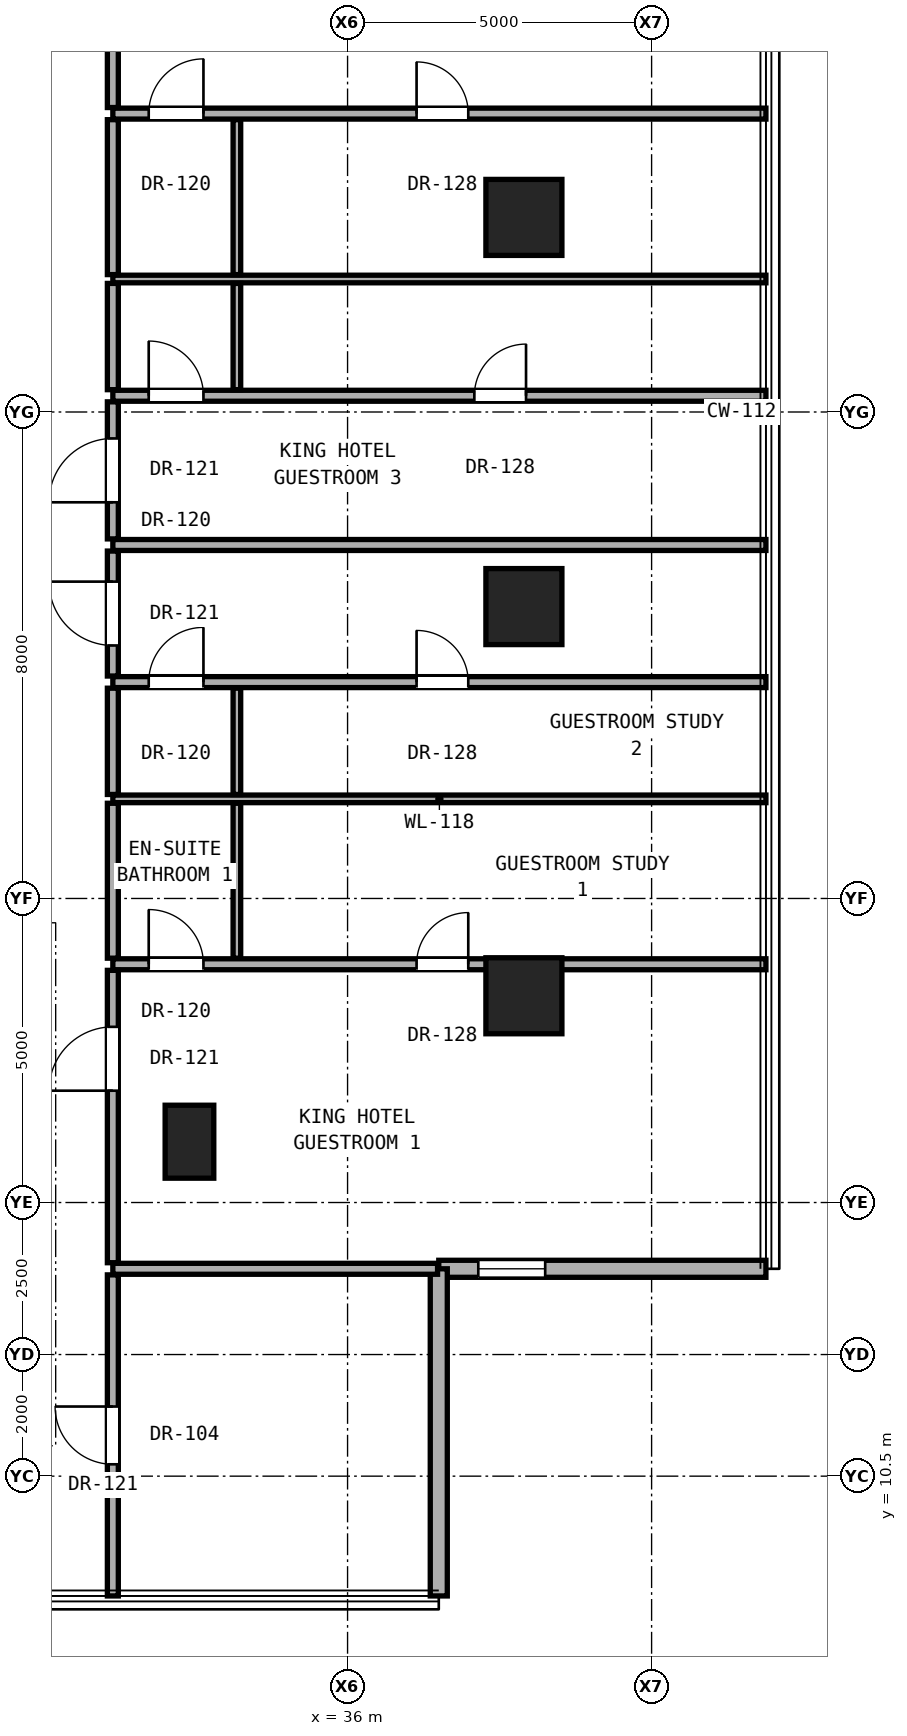
"""IFC4 building model, lengths in metres.
Left out: names, types, materials, properties, quantities, classifications, styles, units other than length and angle.
Written with IfcOpenShell. Run it as: python <this file> out.ifc"""

import sys

from ifc_helpers import new_model, si_unit, direction, frame, frame_2d, origin, origin_2d, place, context, subcontext, project, spatial, rectangle, hollow_rectangle, extrude, element, fill, save


model = new_model("IFC4")
c1 = context("Model", 3, precision=1e-05, world=origin(), true_north=direction((0.0, 1.0)))
c2 = subcontext(c1, "Body", "Model", "MODEL_VIEW")
j1 = project(units=[si_unit("LENGTHUNIT", "METRE"), si_unit("PLANEANGLEUNIT", "RADIAN")], contexts=[c1])
p1 = place(None, origin())
s1 = spatial("IfcSite", under=j1, at=p1, CompositionType="ELEMENT")
p2 = place(p1, origin())
s2 = spatial("IfcBuilding", under=s1, at=p2, CompositionType="ELEMENT")
p3 = place(p2, frame((0.0, 0.0, 38.9)))
s3 = spatial("IfcBuildingStorey", under=s2, at=p3, CompositionType="ELEMENT", Elevation=38.9)
for number, where, z_axis, x_axis in (
    (1, (38.9, 18.4, 0.0), (0.0, 0.0, 1.0), (1.0, 0.0, 0.0)),
    (2, (38.9, 24.8, 0.0), (0.0, 0.0, 1.0), (1.0, 0.0, 0.0)),
    (3, (38.9, 31.2, 0.0), (0.0, 0.0, 1.0), (1.0, 0.0, 0.0)),
):
    element("IfcColumn", number, at=place(p3, frame(where, z_axis=z_axis, x_axis=x_axis)), inside=s3, PredefinedType="COLUMN", context=c2, shape_type="SweptSolid", body=[
        extrude(hollow_rectangle(XDim=1.25, YDim=1.25, WallThickness=0.07, at=origin_2d()), origin(), (0.0, 0.0, 1.0), 3.3),
    ])
p4 = place(p3, frame((33.4, 16.0, 0.0), z_axis=(0.0, 0.0, 1.0), x_axis=(1.0, 0.0, 0.0)))
e4 = element("IfcColumn", 4, at=p4, inside=s3, PredefinedType="PILASTER", context=c2, shape_type="SweptSolid", body=[
    extrude(rectangle(XDim=0.8, YDim=1.2, at=origin_2d()), origin(), (0.0, 0.0, 1.0), 3.3),
])
p5 = place(p3, frame((37.5, 13.91, 0.0), z_axis=(0.0, 0.0, 1.0), x_axis=(1.0, 0.0, 0.0)))
e5 = element("IfcWall", 5, at=p5, inside=s3, PredefinedType="SOLIDWALL", context=c2, shape_type="SweptSolid", body=[
    extrude(rectangle(XDim=5.38, YDim=0.28, at=frame_2d((2.69, 0.0))), origin(), (0.0, 0.0, 1.0), 3.04),
])
p6 = place(p5, frame((0.65, 0.0, 0.85)))
e6 = element("IfcOpeningElement", 6, at=p6, cuts=e5, PredefinedType="OPENING", context=c2, shape_type="SweptSolid", body=[
    extrude(rectangle(XDim=1.1, YDim=2.0, at=frame_2d((0.55, 1.0))), frame((0.0, 0.15, 0.0), z_axis=(0.0, -1.0, 0.0), x_axis=(1.0, 0.0, 0.0)), (0.0, 0.0, 1.0), 0.3),
])
p7 = place(p3, frame((37.5, 8.53, 0.0), z_axis=(0.0, 0.0, 1.0), x_axis=(0.0, 1.0, 0.0)))
e7 = element("IfcWall", 7, at=p7, inside=s3, PredefinedType="SOLIDWALL", context=c2, shape_type="SweptSolid", body=[
    extrude(rectangle(XDim=5.38, YDim=0.28, at=frame_2d((2.69, 0.0))), origin(), (0.0, 0.0, 1.0), 3.04),
])
p8 = place(p3, frame((32.14, 13.91, 0.0), z_axis=(0.0, 0.0, 1.0), x_axis=(1.0, 0.0, 0.0)))
e8 = element("IfcWall", 8, at=p8, inside=s3, PredefinedType="PARTITIONING", context=c2, shape_type="SweptSolid", body=[
    extrude(rectangle(XDim=5.34, YDim=0.18, at=frame_2d((2.67, 0.0))), origin(), (0.0, 0.0, 1.0), 3.06),
])
p9 = place(p3, frame((32.14, 18.918, 0.0), z_axis=(0.0, 0.0, 1.0), x_axis=(1.0, 0.0, 0.0)))
e9 = element("IfcWall", 9, at=p9, inside=s3, PredefinedType="PARTITIONING", context=c2, shape_type="SweptSolid", body=[
    extrude(rectangle(XDim=10.74, YDim=0.18, at=frame_2d((5.37, 0.0))), origin(), (0.0, 0.0, 1.0), 2.125),
])
p10 = place(p9, frame((4.995, 0.0, 0.0)))
e10 = element("IfcOpeningElement", 10, at=p10, cuts=e9, PredefinedType="OPENING", context=c2, shape_type="SweptSolid", body=[
    extrude(rectangle(XDim=0.85, YDim=2.01, at=frame_2d((0.425, 1.005))), frame((0.0, 0.1, 0.0), z_axis=(0.0, -1.0, 0.0), x_axis=(1.0, 0.0, 0.0)), (0.0, 0.0, 1.0), 0.2),
])
p11 = place(p9, frame((0.59, 0.0, 0.0)))
e11 = element("IfcOpeningElement", 11, at=p11, cuts=e9, PredefinedType="OPENING", context=c2, shape_type="SweptSolid", body=[
    extrude(rectangle(XDim=0.9, YDim=2.1, at=frame_2d((0.45, 1.05))), frame((0.0, 0.1, 0.0), z_axis=(0.0, -1.0, 0.0), x_axis=(1.0, 0.0, 0.0)), (0.0, 0.0, 1.0), 0.2),
])
p12 = place(p3, frame((32.14, 21.638, 0.0), z_axis=(0.0, 0.0, 1.0), x_axis=(1.0, 0.0, 0.0)))
e12 = element("IfcWall", 12, at=p12, inside=s3, PredefinedType="PARTITIONING", context=c2, shape_type="SweptSolid", body=[
    extrude(rectangle(XDim=10.74, YDim=0.125, at=frame_2d((5.37, 0.0))), origin(), (0.0, 0.0, 1.0), 2.125),
])
p13 = place(p3, frame((32.14, 23.558, 0.0), z_axis=(0.0, 0.0, 1.0), x_axis=(1.0, 0.0, 0.0)))
e13 = element("IfcWall", 13, at=p13, inside=s3, PredefinedType="PARTITIONING", context=c2, shape_type="SweptSolid", body=[
    extrude(rectangle(XDim=10.74, YDim=0.18, at=frame_2d((5.37, 0.0))), origin(), (0.0, 0.0, 1.0), 2.125),
])
p14 = place(p13, frame((4.995, 0.0, 0.0)))
e14 = element("IfcOpeningElement", 14, at=p14, cuts=e13, PredefinedType="OPENING", context=c2, shape_type="SweptSolid", body=[
    extrude(rectangle(XDim=0.85, YDim=2.01, at=frame_2d((0.425, 1.005))), frame((0.0, 0.1, 0.0), z_axis=(0.0, -1.0, 0.0), x_axis=(1.0, 0.0, 0.0)), (0.0, 0.0, 1.0), 0.2),
])
p15 = place(p13, frame((0.59, 0.0, 0.0)))
e15 = element("IfcOpeningElement", 15, at=p15, cuts=e13, PredefinedType="OPENING", context=c2, shape_type="SweptSolid", body=[
    extrude(rectangle(XDim=0.9, YDim=2.1, at=frame_2d((0.45, 1.05))), frame((0.0, 0.1, 0.0), z_axis=(0.0, -1.0, 0.0), x_axis=(1.0, 0.0, 0.0)), (0.0, 0.0, 1.0), 0.2),
])
p16 = place(p3, frame((32.14, 25.813, 0.0), z_axis=(0.0, 0.0, 1.0), x_axis=(1.0, 0.0, 0.0)))
e16 = element("IfcWall", 16, at=p16, inside=s3, PredefinedType="PARTITIONING", context=c2, shape_type="SweptSolid", body=[
    extrude(rectangle(XDim=10.74, YDim=0.18, at=frame_2d((5.37, 0.0))), origin(), (0.0, 0.0, 1.0), 2.125),
])
p17 = place(p3, frame((32.14, 28.267, 0.0), z_axis=(0.0, 0.0, 1.0), x_axis=(1.0, 0.0, 0.0)))
e17 = element("IfcWall", 17, at=p17, inside=s3, PredefinedType="PARTITIONING", context=c2, shape_type="SweptSolid", body=[
    extrude(rectangle(XDim=10.74, YDim=0.18, at=frame_2d((5.37, 0.0))), origin(), (0.0, 0.0, 1.0), 2.125),
])
p18 = place(p17, frame((5.945, 0.0, 0.0)))
e18 = element("IfcOpeningElement", 18, at=p18, cuts=e17, PredefinedType="OPENING", context=c2, shape_type="SweptSolid", body=[
    extrude(rectangle(XDim=0.85, YDim=2.01, at=frame_2d((0.425, 1.005))), frame((0.0, 0.1, 0.0), z_axis=(0.0, -1.0, 0.0), x_axis=(1.0, 0.0, 0.0)), (0.0, 0.0, 1.0), 0.2),
])
p19 = place(p17, frame((0.59, 0.0, 0.0)))
e19 = element("IfcOpeningElement", 19, at=p19, cuts=e17, PredefinedType="OPENING", context=c2, shape_type="SweptSolid", body=[
    extrude(rectangle(XDim=0.9, YDim=2.1, at=frame_2d((0.45, 1.05))), frame((0.0, 0.1, 0.0), z_axis=(0.0, -1.0, 0.0), x_axis=(1.0, 0.0, 0.0)), (0.0, 0.0, 1.0), 0.2),
])
p20 = place(p3, frame((32.14, 30.187, 0.0), z_axis=(0.0, 0.0, 1.0), x_axis=(1.0, 0.0, 0.0)))
e20 = element("IfcWall", 20, at=p20, inside=s3, PredefinedType="PARTITIONING", context=c2, shape_type="SweptSolid", body=[
    extrude(rectangle(XDim=10.74, YDim=0.125, at=frame_2d((5.37, 0.0))), origin(), (0.0, 0.0, 1.0), 2.125),
])
p21 = place(p3, frame((32.14, 32.907, 0.0), z_axis=(0.0, 0.0, 1.0), x_axis=(1.0, 0.0, 0.0)))
e21 = element("IfcWall", 21, at=p21, inside=s3, PredefinedType="PARTITIONING", context=c2, shape_type="SweptSolid", body=[
    extrude(rectangle(XDim=10.74, YDim=0.18, at=frame_2d((5.37, 0.0))), origin(), (0.0, 0.0, 1.0), 2.125),
])
p22 = place(p21, frame((4.995, 0.0, 0.0)))
e22 = element("IfcOpeningElement", 22, at=p22, cuts=e21, PredefinedType="OPENING", context=c2, shape_type="SweptSolid", body=[
    extrude(rectangle(XDim=0.85, YDim=2.01, at=frame_2d((0.425, 1.005))), frame((0.0, 0.1, 0.0), z_axis=(0.0, -1.0, 0.0), x_axis=(1.0, 0.0, 0.0)), (0.0, 0.0, 1.0), 0.2),
])
p23 = place(p21, frame((0.59, 0.0, 0.0)))
e23 = element("IfcOpeningElement", 23, at=p23, cuts=e21, PredefinedType="OPENING", context=c2, shape_type="SweptSolid", body=[
    extrude(rectangle(XDim=0.9, YDim=2.1, at=frame_2d((0.45, 1.05))), frame((0.0, 0.1, 0.0), z_axis=(0.0, -1.0, 0.0), x_axis=(1.0, 0.0, 0.0)), (0.0, 0.0, 1.0), 0.2),
])
p24 = place(p3, frame((32.14, 8.53, 0.0), z_axis=(0.0, 0.0, 1.0), x_axis=(0.0, 1.0, 0.0)))
e24 = element("IfcWall", 24, at=p24, inside=s3, PredefinedType="PARTITIONING", context=c2, shape_type="SweptSolid", body=[
    extrude(rectangle(XDim=5.28, YDim=0.18, at=frame_2d((2.64, 0.0))), origin(), (0.0, 0.0, 1.0), 3.06),
])
p25 = place(p24, frame((2.165, 0.0, 0.0)))
e25 = element("IfcOpeningElement", 25, at=p25, cuts=e24, PredefinedType="OPENING", context=c2, shape_type="SweptSolid", body=[
    extrude(rectangle(XDim=0.95, YDim=2.15, at=frame_2d((0.475, 1.075))), frame((0.0, 0.1, 0.0), z_axis=(0.0, -1.0, 0.0), x_axis=(1.0, 0.0, 0.0)), (0.0, 0.0, 1.0), 0.2),
])
p26 = place(p3, frame((32.14, 14.01, 0.0), z_axis=(0.0, 0.0, 1.0), x_axis=(0.0, 1.0, 0.0)))
e26 = element("IfcWall", 26, at=p26, inside=s3, PredefinedType="PARTITIONING", context=c2, shape_type="SweptSolid", body=[
    extrude(rectangle(XDim=4.808, YDim=0.18, at=frame_2d((2.404, 0.0))), origin(), (0.0, 0.0, 1.0), 2.436),
])
p27 = place(p26, frame((2.829, 0.0, 0.0)))
e27 = element("IfcOpeningElement", 27, at=p27, cuts=e26, PredefinedType="OPENING", context=c2, shape_type="SweptSolid", body=[
    extrude(rectangle(XDim=1.05, YDim=2.2, at=frame_2d((0.525, 1.1))), frame((0.0, 0.1, 0.0), z_axis=(0.0, -1.0, 0.0), x_axis=(1.0, 0.0, 0.0)), (0.0, 0.0, 1.0), 0.2),
])
p28 = place(p3, frame((32.14, 19.018, 0.0), z_axis=(0.0, 0.0, 1.0), x_axis=(0.0, 1.0, 0.0)))
e28 = element("IfcWall", 28, at=p28, inside=s3, PredefinedType="PARTITIONING", context=c2, shape_type="SweptSolid", body=[
    extrude(rectangle(XDim=2.547, YDim=0.18, at=frame_2d((1.274, 0.0))), origin(), (0.0, 0.0, 1.0), 3.06),
])
p29 = place(p3, frame((32.14, 21.71, 0.0), z_axis=(0.0, 0.0, 1.0), x_axis=(0.0, 1.0, 0.0)))
e29 = element("IfcWall", 29, at=p29, inside=s3, PredefinedType="PARTITIONING", context=c2, shape_type="SweptSolid", body=[
    extrude(rectangle(XDim=1.748, YDim=0.18, at=frame_2d((0.874, 0.0))), origin(), (0.0, 0.0, 1.0), 3.06),
])
p30 = place(p3, frame((32.14, 23.658, 0.0), z_axis=(0.0, 0.0, 1.0), x_axis=(0.0, 1.0, 0.0)))
e30 = element("IfcWall", 30, at=p30, inside=s3, PredefinedType="PARTITIONING", context=c2, shape_type="SweptSolid", body=[
    extrude(rectangle(XDim=2.055, YDim=0.18, at=frame_2d((1.027, 0.0))), origin(), (0.0, 0.0, 1.0), 2.279),
])
p31 = place(p30, frame((0.502, 0.0, 0.0)))
e31 = element("IfcOpeningElement", 31, at=p31, cuts=e30, PredefinedType="OPENING", context=c2, shape_type="SweptSolid", body=[
    extrude(rectangle(XDim=1.05, YDim=2.2, at=frame_2d((0.525, 1.1))), frame((0.0, 0.1, 0.0), z_axis=(0.0, -1.0, 0.0), x_axis=(1.0, 0.0, 0.0)), (0.0, 0.0, 1.0), 0.2),
])
p32 = place(p3, frame((32.14, 25.913, 0.0), z_axis=(0.0, 0.0, 1.0), x_axis=(0.0, 1.0, 0.0)))
e32 = element("IfcWall", 32, at=p32, inside=s3, PredefinedType="PARTITIONING", context=c2, shape_type="SweptSolid", body=[
    extrude(rectangle(XDim=2.254, YDim=0.18, at=frame_2d((1.127, 0.0))), origin(), (0.0, 0.0, 1.0), 3.06),
])
p33 = place(p32, frame((0.602, 0.0, 0.0)))
e33 = element("IfcOpeningElement", 33, at=p33, cuts=e32, PredefinedType="OPENING", context=c2, shape_type="SweptSolid", body=[
    extrude(rectangle(XDim=1.05, YDim=2.2, at=frame_2d((0.525, 1.1))), frame((0.0, 0.1, 0.0), z_axis=(0.0, -1.0, 0.0), x_axis=(1.0, 0.0, 0.0)), (0.0, 0.0, 1.0), 0.2),
])
p34 = place(p3, frame((32.14, 28.367, 0.0), z_axis=(0.0, 0.0, 1.0), x_axis=(0.0, 1.0, 0.0)))
e34 = element("IfcWall", 34, at=p34, inside=s3, PredefinedType="PARTITIONING", context=c2, shape_type="SweptSolid", body=[
    extrude(rectangle(XDim=1.748, YDim=0.18, at=frame_2d((0.874, 0.0))), origin(), (0.0, 0.0, 1.0), 3.06),
])
p35 = place(p3, frame((32.14, 30.26, 0.0), z_axis=(0.0, 0.0, 1.0), x_axis=(0.0, 1.0, 0.0)))
e35 = element("IfcWall", 35, at=p35, inside=s3, PredefinedType="PARTITIONING", context=c2, shape_type="SweptSolid", body=[
    extrude(rectangle(XDim=2.547, YDim=0.18, at=frame_2d((1.274, 0.0))), origin(), (0.0, 0.0, 1.0), 2.279),
])
p36 = place(p3, frame((32.14, 33.007, 0.0), z_axis=(0.0, 0.0, 1.0), x_axis=(0.0, 1.0, 0.0)))
e36 = element("IfcWall", 36, at=p36, inside=s3, PredefinedType="PARTITIONING", context=c2, shape_type="SweptSolid", body=[
    extrude(rectangle(XDim=8.983, YDim=0.18, at=frame_2d((4.491, 0.0))), origin(), (0.0, 0.0, 1.0), 2.436),
])
p37 = place(p36, frame((3.967, 0.0, 0.0)))
e37 = element("IfcOpeningElement", 37, at=p37, cuts=e36, PredefinedType="OPENING", context=c2, shape_type="SweptSolid", body=[
    extrude(rectangle(XDim=1.05, YDim=2.2, at=frame_2d((0.525, 1.1))), frame((0.0, 0.1, 0.0), z_axis=(0.0, -1.0, 0.0), x_axis=(1.0, 0.0, 0.0)), (0.0, 0.0, 1.0), 0.2),
])
p38 = place(p3, frame((34.18, 19.018, 0.0), z_axis=(0.0, 0.0, 1.0), x_axis=(0.0, 1.0, 0.0)))
e38 = element("IfcWall", 38, at=p38, inside=s3, PredefinedType="PARTITIONING", context=c2, shape_type="SweptSolid", body=[
    extrude(rectangle(XDim=2.547, YDim=0.125, at=frame_2d((1.274, 0.0))), origin(), (0.0, 0.0, 1.0), 3.06),
])
for number, where, z_axis, x_axis in (
    (39, (34.18, 21.71, 0.0), (0.0, 0.0, 1.0), (0.0, 1.0, 0.0)),
    (40, (34.18, 28.367, 0.0), (0.0, 0.0, 1.0), (0.0, 1.0, 0.0)),
):
    element("IfcWall", number, at=place(p3, frame(where, z_axis=z_axis, x_axis=x_axis)), inside=s3, PredefinedType="PARTITIONING", context=c2, shape_type="SweptSolid", body=[
        extrude(rectangle(XDim=1.748, YDim=0.125, at=frame_2d((0.874, 0.0))), origin(), (0.0, 0.0, 1.0), 3.06),
    ])
p39 = place(p3, frame((34.18, 30.26, 0.0), z_axis=(0.0, 0.0, 1.0), x_axis=(0.0, 1.0, 0.0)))
e41 = element("IfcWall", 41, at=p39, inside=s3, PredefinedType="PARTITIONING", context=c2, shape_type="SweptSolid", body=[
    extrude(rectangle(XDim=2.547, YDim=0.125, at=frame_2d((1.274, 0.0))), origin(), (0.0, 0.0, 1.0), 2.279),
])
p40 = place(p6, origin())
e42 = element("IfcWindow", 42, at=p40, inside=s3, PartitioningType="SINGLE_PANEL", PredefinedType="WINDOW", context=c2, shape_type="SweptSolid", body=[
    extrude(rectangle(XDim=1.1, YDim=2.0, at=frame_2d((0.55, 1.0))), frame((0.0, 0.03, 0.0), z_axis=(0.0, -1.0, 0.0), x_axis=(1.0, 0.0, 0.0)), (0.0, 0.0, 1.0), 0.06),
])
fill(e6, e42)
p41 = place(p27, origin())
e43 = element("IfcDoor", 43, at=p41, inside=s3, OperationType="SINGLE_SWING_LEFT", PredefinedType="DOOR", context=c2, shape_type="SweptSolid", body=[
    extrude(rectangle(XDim=1.05, YDim=2.2, at=frame_2d((0.525, 1.1))), frame((0.0, 0.025, 0.0), z_axis=(0.0, -1.0, 0.0), x_axis=(1.0, 0.0, 0.0)), (0.0, 0.0, 1.0), 0.05),
])
fill(e27, e43)
p42 = place(p10, origin())
e44 = element("IfcDoor", 44, at=p42, inside=s3, OperationType="SINGLE_SWING_RIGHT", PredefinedType="DOOR", context=c2, shape_type="SweptSolid", body=[
    extrude(rectangle(XDim=0.85, YDim=2.01, at=frame_2d((0.425, 1.005))), frame((0.0, 0.025, 0.0), z_axis=(0.0, -1.0, 0.0), x_axis=(1.0, 0.0, 0.0)), (0.0, 0.0, 1.0), 0.05),
])
fill(e10, e44)
p43 = place(p11, origin())
e45 = element("IfcDoor", 45, at=p43, inside=s3, OperationType="SINGLE_SWING_LEFT", PredefinedType="DOOR", context=c2, shape_type="SweptSolid", body=[
    extrude(rectangle(XDim=0.9, YDim=2.1, at=frame_2d((0.45, 1.05))), frame((0.0, 0.025, 0.0), z_axis=(0.0, -1.0, 0.0), x_axis=(1.0, 0.0, 0.0)), (0.0, 0.0, 1.0), 0.05),
])
fill(e11, e45)
p44 = place(p31, origin())
e46 = element("IfcDoor", 46, at=p44, inside=s3, OperationType="SINGLE_SWING_RIGHT", PredefinedType="DOOR", context=c2, shape_type="SweptSolid", body=[
    extrude(rectangle(XDim=1.05, YDim=2.2, at=frame_2d((0.525, 1.1))), frame((0.0, 0.025, 0.0), z_axis=(0.0, -1.0, 0.0), x_axis=(1.0, 0.0, 0.0)), (0.0, 0.0, 1.0), 0.05),
])
fill(e31, e46)
p45 = place(p14, origin())
e47 = element("IfcDoor", 47, at=p45, inside=s3, OperationType="SINGLE_SWING_LEFT", PredefinedType="DOOR", context=c2, shape_type="SweptSolid", body=[
    extrude(rectangle(XDim=0.85, YDim=2.01, at=frame_2d((0.425, 1.005))), frame((0.0, 0.025, 0.0), z_axis=(0.0, -1.0, 0.0), x_axis=(1.0, 0.0, 0.0)), (0.0, 0.0, 1.0), 0.05),
])
fill(e14, e47)
p46 = place(p15, origin())
e48 = element("IfcDoor", 48, at=p46, inside=s3, OperationType="SINGLE_SWING_RIGHT", PredefinedType="DOOR", context=c2, shape_type="SweptSolid", body=[
    extrude(rectangle(XDim=0.9, YDim=2.1, at=frame_2d((0.45, 1.05))), frame((0.0, 0.025, 0.0), z_axis=(0.0, -1.0, 0.0), x_axis=(1.0, 0.0, 0.0)), (0.0, 0.0, 1.0), 0.05),
])
fill(e15, e48)
p47 = place(p33, origin())
e49 = element("IfcDoor", 49, at=p47, inside=s3, OperationType="SINGLE_SWING_LEFT", PredefinedType="DOOR", context=c2, shape_type="SweptSolid", body=[
    extrude(rectangle(XDim=1.05, YDim=2.2, at=frame_2d((0.525, 1.1))), frame((0.0, 0.025, 0.0), z_axis=(0.0, -1.0, 0.0), x_axis=(1.0, 0.0, 0.0)), (0.0, 0.0, 1.0), 0.05),
])
fill(e33, e49)
p48 = place(p18, origin())
e50 = element("IfcDoor", 50, at=p48, inside=s3, OperationType="SINGLE_SWING_RIGHT", PredefinedType="DOOR", context=c2, shape_type="SweptSolid", body=[
    extrude(rectangle(XDim=0.85, YDim=2.01, at=frame_2d((0.425, 1.005))), frame((0.0, 0.025, 0.0), z_axis=(0.0, -1.0, 0.0), x_axis=(1.0, 0.0, 0.0)), (0.0, 0.0, 1.0), 0.05),
])
fill(e18, e50)
p49 = place(p19, origin())
e51 = element("IfcDoor", 51, at=p49, inside=s3, OperationType="SINGLE_SWING_LEFT", PredefinedType="DOOR", context=c2, shape_type="SweptSolid", body=[
    extrude(rectangle(XDim=0.9, YDim=2.1, at=frame_2d((0.45, 1.05))), frame((0.0, 0.025, 0.0), z_axis=(0.0, -1.0, 0.0), x_axis=(1.0, 0.0, 0.0)), (0.0, 0.0, 1.0), 0.05),
])
fill(e19, e51)
p50 = place(p22, origin())
e52 = element("IfcDoor", 52, at=p50, inside=s3, OperationType="SINGLE_SWING_LEFT", PredefinedType="DOOR", context=c2, shape_type="SweptSolid", body=[
    extrude(rectangle(XDim=0.85, YDim=2.01, at=frame_2d((0.425, 1.005))), frame((0.0, 0.025, 0.0), z_axis=(0.0, -1.0, 0.0), x_axis=(1.0, 0.0, 0.0)), (0.0, 0.0, 1.0), 0.05),
])
fill(e22, e52)
p51 = place(p23, origin())
e53 = element("IfcDoor", 53, at=p51, inside=s3, OperationType="SINGLE_SWING_RIGHT", PredefinedType="DOOR", context=c2, shape_type="SweptSolid", body=[
    extrude(rectangle(XDim=0.9, YDim=2.1, at=frame_2d((0.45, 1.05))), frame((0.0, 0.025, 0.0), z_axis=(0.0, -1.0, 0.0), x_axis=(1.0, 0.0, 0.0)), (0.0, 0.0, 1.0), 0.05),
])
fill(e23, e53)
p52 = place(p25, origin())
e54 = element("IfcDoor", 54, at=p52, inside=s3, OperationType="SINGLE_SWING_RIGHT", PredefinedType="DOOR", context=c2, shape_type="SweptSolid", body=[
    extrude(rectangle(XDim=0.95, YDim=2.15, at=frame_2d((0.475, 1.075))), frame((0.0, 0.025, 0.0), z_axis=(0.0, -1.0, 0.0), x_axis=(1.0, 0.0, 0.0)), (0.0, 0.0, 1.0), 0.05),
])
fill(e25, e54)
save(model, sys.argv[1])
